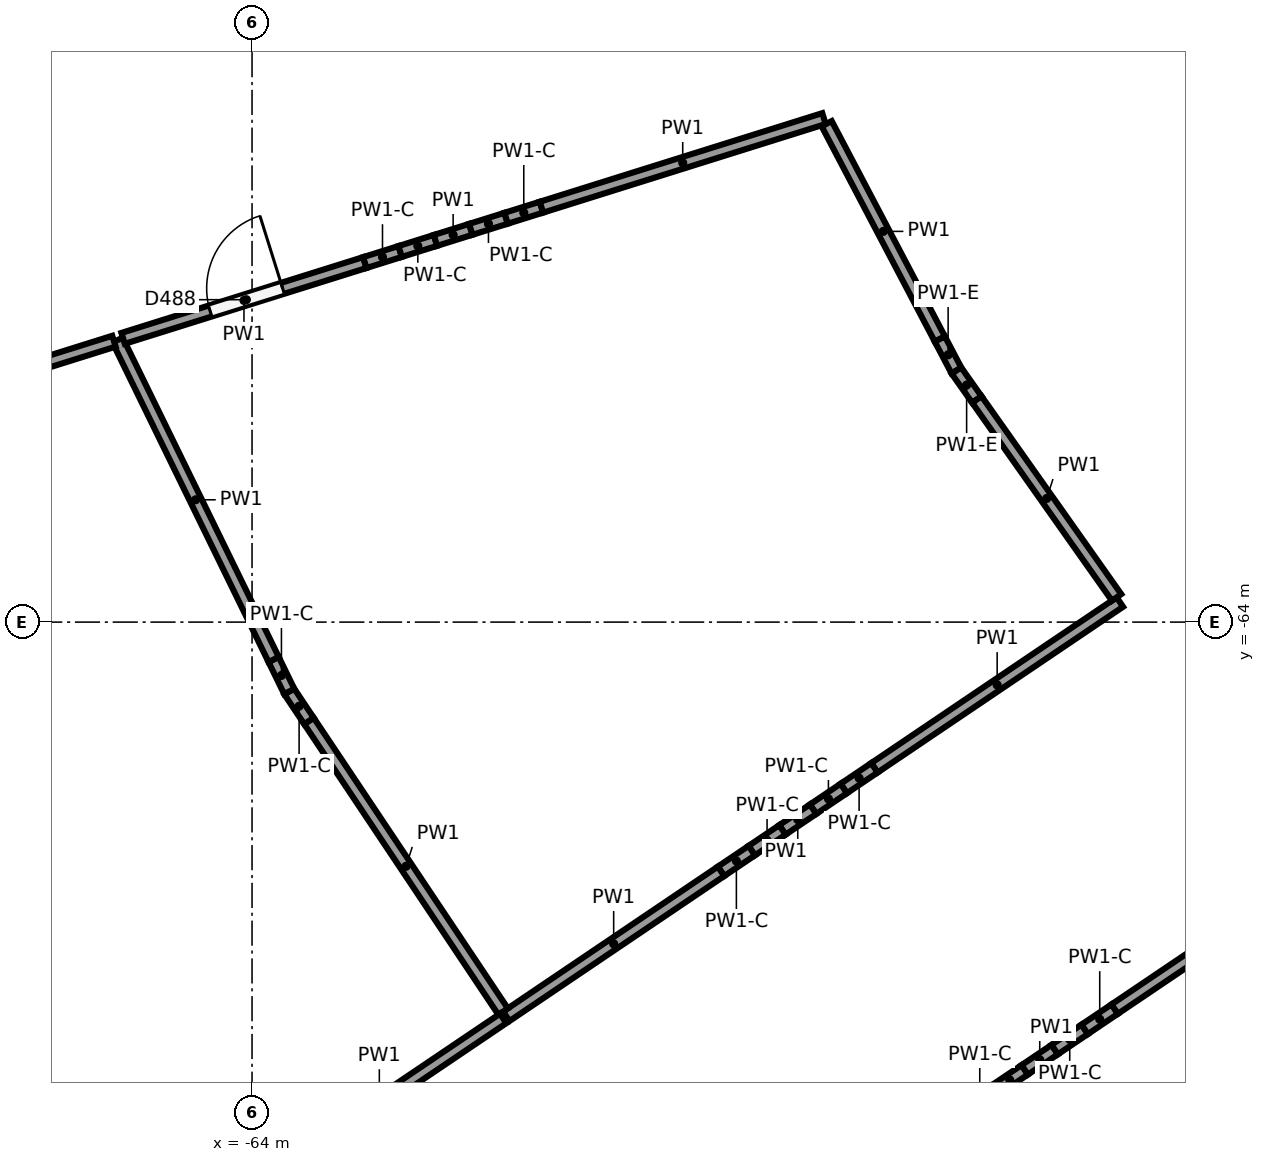
"""IFC4 building model, lengths in metres.
Left out: names, types, materials, properties, quantities, classifications, styles, units other than length and angle.
Written with IfcOpenShell. Run it as: python <this file> out.ifc"""

import sys

from ifc_helpers import new_model, si_unit, direction, frame, frame_2d, origin, origin_2d, place, context, subcontext, project, spatial, rectangle, circle, extrude, element, fill, save


model = new_model("IFC4")
c1 = context("Model", 3, precision=1e-05, world=origin(), true_north=direction((0.0, 1.0)))
c2 = subcontext(c1, "Body", "Model", "MODEL_VIEW")
j1 = project(units=[si_unit("LENGTHUNIT", "METRE"), si_unit("PLANEANGLEUNIT", "RADIAN")], contexts=[c1])
p1 = place(None, origin())
s1 = spatial("IfcSite", under=j1, at=p1, CompositionType="ELEMENT")
p2 = place(p1, origin())
s2 = spatial("IfcBuilding", under=s1, at=p2, CompositionType="ELEMENT")
p3 = place(p2, frame((0.0, 0.0, -4.0)))
s3 = spatial("IfcBuildingStorey", under=s2, at=p3, CompositionType="ELEMENT", Elevation=-4.0)
p4 = place(p3, frame((-61.723, -56.716, -0.4), z_axis=(0.0, 0.0, 1.0), x_axis=(1.0, 0.0, 0.0)))
e1 = element("IfcColumn", 1, at=p4, inside=s3, PredefinedType="COLUMN", context=c2, shape_type="SweptSolid", body=[
    extrude(circle(Radius=0.45, at=origin_2d()), origin(), (0.0, 0.0, 1.0), 4.4),
])
p5 = place(p3, frame((-62.964, -57.104, -0.4), z_axis=(0.0, 0.0, 1.0), x_axis=(1.0, 0.0, 0.0)))
e2 = element("IfcColumn", 2, at=p5, inside=s3, PredefinedType="COLUMN", context=c2, shape_type="SweptSolid", body=[
    extrude(circle(Radius=0.4, at=origin_2d()), origin(), (0.0, 0.0, 1.0), 4.4),
])
for number, where, z_axis, x_axis in (
    (3, (-54.364, -60.513, -0.4), (0.0, 0.0, 1.0), (1.0, 0.0, 0.0)),
    (4, (-59.049, -62.766, -0.4), (0.0, 0.0, 1.0), (1.0, 0.0, 0.0)),
):
    element("IfcColumn", number, at=place(p3, frame(where, z_axis=z_axis, x_axis=x_axis)), inside=s3, PredefinedType="COLUMN", context=c2, shape_type="SweptSolid", body=[
        extrude(circle(Radius=0.45, at=origin_2d()), origin(), (0.0, 0.0, 1.0), 4.4),
    ])
p6 = place(p3, frame((-60.222, -63.331, -0.4), z_axis=(0.0, 0.0, 1.0), x_axis=(1.0, 0.0, 0.0)))
e5 = element("IfcColumn", 5, at=p6, inside=s3, PredefinedType="COLUMN", context=c2, shape_type="SweptSolid", body=[
    extrude(circle(Radius=0.4, at=origin_2d()), origin(), (0.0, 0.0, 1.0), 4.4),
])
p7 = place(p3, frame((-54.82, -67.902, -0.4), z_axis=(0.0, 0.0, 1.0), x_axis=(1.0, 0.0, 0.0)))
e6 = element("IfcColumn", 6, at=p7, inside=s3, PredefinedType="COLUMN", context=c2, shape_type="SweptSolid", body=[
    extrude(circle(Radius=0.45, at=origin_2d()), origin(), (0.0, 0.0, 1.0), 4.4),
])
p8 = place(p3, frame((-55.94, -68.658, -0.4), z_axis=(0.0, 0.0, 1.0), x_axis=(1.0, 0.0, 0.0)))
e7 = element("IfcColumn", 7, at=p8, inside=s3, PredefinedType="COLUMN", context=c2, shape_type="SweptSolid", body=[
    extrude(circle(Radius=0.4, at=origin_2d()), origin(), (0.0, 0.0, 1.0), 4.4),
])
p9 = place(p3, frame((-52.582, -63.737, 0.0), z_axis=(0.0, 0.0, 1.0), x_axis=(-0.82882615394, -0.559506216718, 0.0)))
e8 = element("IfcWall", 8, at=p9, inside=s3, PredefinedType="PARTITIONING", context=c2, shape_type="SweptSolid", body=[
    extrude(rectangle(XDim=3.896, YDim=0.15, at=frame_2d((1.948, 0.0))), origin(), (0.0, 0.0, 1.0), 3.6),
])
p10 = place(p3, frame((-55.811, -65.917, 0.0), z_axis=(0.0, 0.0, 1.0), x_axis=(-0.828953242646, -0.559317907372, 0.0)))
e9 = element("IfcWall", 9, at=p10, inside=s3, PredefinedType="PARTITIONING", context=c2, shape_type="SweptSolid", body=[
    extrude(rectangle(XDim=0.487, YDim=0.15, at=frame_2d((0.244, 0.0))), origin(), (0.0, 0.0, 1.0), 2.7),
])
p11 = place(p3, frame((-56.215, -66.189, 0.0), z_axis=(0.0, 0.0, 1.0), x_axis=(-0.828796357195, -0.559550353678, 0.0)))
e10 = element("IfcWall", 10, at=p11, inside=s3, PredefinedType="PARTITIONING", context=c2, shape_type="SweptSolid", body=[
    extrude(rectangle(XDim=0.487, YDim=0.15, at=frame_2d((0.243, 0.0))), origin(), (0.0, 0.0, 1.0), 2.7),
])
p12 = place(p3, frame((-56.618, -66.461, 0.0), z_axis=(0.0, 0.0, 1.0), x_axis=(-0.828953242646, -0.559317907372, 0.0)))
e11 = element("IfcWall", 11, at=p12, inside=s3, PredefinedType="PARTITIONING", context=c2, shape_type="SweptSolid", body=[
    extrude(rectangle(XDim=0.487, YDim=0.15, at=frame_2d((0.244, 0.0))), origin(), (0.0, 0.0, 1.0), 3.6),
])
p13 = place(p3, frame((-57.022, -66.734, 0.0), z_axis=(0.0, 0.0, 1.0), x_axis=(-0.828563830016, -0.559894614717, 0.0)))
e12 = element("IfcWall", 12, at=p13, inside=s3, PredefinedType="PARTITIONING", context=c2, shape_type="SweptSolid", body=[
    extrude(rectangle(XDim=0.487, YDim=0.15, at=frame_2d((0.244, 0.0))), origin(), (0.0, 0.0, 1.0), 2.7),
])
p14 = place(p3, frame((-57.426, -67.007, 0.0), z_axis=(0.0, 0.0, 1.0), x_axis=(-0.828796357195, -0.559550353678, 0.0)))
e13 = element("IfcWall", 13, at=p14, inside=s3, PredefinedType="PARTITIONING", context=c2, shape_type="SweptSolid", body=[
    extrude(rectangle(XDim=0.487, YDim=0.15, at=frame_2d((0.243, 0.0))), origin(), (0.0, 0.0, 1.0), 2.7),
])
p15 = place(p3, frame((-57.829, -67.279, 0.0), z_axis=(0.0, 0.0, 1.0), x_axis=(-0.828841201566, -0.559483925226, 0.0)))
e14 = element("IfcWall", 14, at=p15, inside=s3, PredefinedType="PARTITIONING", context=c2, shape_type="SweptSolid", body=[
    extrude(rectangle(XDim=3.409, YDim=0.15, at=frame_2d((1.705, 0.0))), origin(), (0.0, 0.0, 1.0), 3.6),
])
p16 = place(p3, frame((-60.697, -69.124, 0.0), z_axis=(0.0, 0.0, 1.0), x_axis=(-0.555582071925, 0.831461701677, 0.0)))
e15 = element("IfcWall", 15, at=p16, inside=s3, PredefinedType="PARTITIONING", context=c2, shape_type="SweptSolid", body=[
    extrude(rectangle(XDim=4.598, YDim=0.15, at=frame_2d((2.299, 0.0))), origin(), (0.0, 0.0, 1.0), 3.6),
])
p17 = place(p3, frame((-63.251, -65.301, 0.0), z_axis=(0.0, 0.0, 1.0), x_axis=(-0.555302810798, 0.831648235927, 0.0)))
e16 = element("IfcWall", 16, at=p17, inside=s3, PredefinedType="PARTITIONING", context=c2, shape_type="SweptSolid", body=[
    extrude(rectangle(XDim=0.467, YDim=0.15, at=frame_2d((0.234, 0.0))), origin(), (0.0, 0.0, 1.0), 2.7),
])
p18 = place(p3, frame((-63.511, -64.912, 0.0), z_axis=(0.0, 0.0, 1.0), x_axis=(-0.439050948337, 0.898462166574, 0.0)))
e17 = element("IfcWall", 17, at=p18, inside=s3, PredefinedType="PARTITIONING", context=c2, shape_type="SweptSolid", body=[
    extrude(rectangle(XDim=0.468, YDim=0.15, at=frame_2d((0.234, 0.0))), origin(), (0.0, 0.0, 1.0), 2.7),
])
p19 = place(p3, frame((-63.716, -64.492, 0.0), z_axis=(0.0, 0.0, 1.0), x_axis=(-0.438947034321, 0.898512938728, 0.0)))
e18 = element("IfcWall", 18, at=p19, inside=s3, PredefinedType="PARTITIONING", context=c2, shape_type="SweptSolid", body=[
    extrude(rectangle(XDim=4.677, YDim=0.15, at=frame_2d((2.338, 0.0))), origin(), (0.0, 0.0, 1.0), 3.6),
])
p20 = place(p3, frame((-65.697, -60.267, 0.0), z_axis=(0.0, 0.0, 1.0), x_axis=(0.95420717929, 0.299146551026, 0.0)))
e19 = element("IfcWall", 19, at=p20, inside=s3, PredefinedType="PARTITIONING", context=c2, shape_type="SweptSolid", body=[
    extrude(rectangle(XDim=3.333, YDim=0.15, at=frame_2d((1.667, 0.0))), origin(), (0.0, 0.0, 1.0), 3.6),
])
p21 = place(p20, frame((1.2, 0.0, 0.0)))
e20 = element("IfcOpeningElement", 20, at=p21, cuts=e19, PredefinedType="OPENING", context=c2, shape_type="SweptSolid", body=[
    extrude(rectangle(XDim=1.0, YDim=2.1, at=frame_2d((0.5, 1.05))), frame((0.0, 0.085, 0.0), z_axis=(0.0, -1.0, 0.0), x_axis=(1.0, 0.0, 0.0)), (0.0, 0.0, 1.0), 0.17),
])
p22 = place(p3, frame((-62.516, -59.27, 0.0), z_axis=(0.0, 0.0, 1.0), x_axis=(0.954194187562, 0.299187988432, 0.0)))
e21 = element("IfcWall", 21, at=p22, inside=s3, PredefinedType="PARTITIONING", context=c2, shape_type="SweptSolid", body=[
    extrude(rectangle(XDim=0.487, YDim=0.15, at=frame_2d((0.244, 0.0))), origin(), (0.0, 0.0, 1.0), 2.7),
])
p23 = place(p3, frame((-62.051, -59.124, 0.0), z_axis=(0.0, 0.0, 1.0), x_axis=(0.954149295482, 0.299331124226, 0.0)))
e22 = element("IfcWall", 22, at=p23, inside=s3, PredefinedType="PARTITIONING", context=c2, shape_type="SweptSolid", body=[
    extrude(rectangle(XDim=0.487, YDim=0.15, at=frame_2d((0.243, 0.0))), origin(), (0.0, 0.0, 1.0), 2.7),
])
p24 = place(p3, frame((-61.587, -58.978, 0.0), z_axis=(0.0, 0.0, 1.0), x_axis=(0.954194187562, 0.299187988432, 0.0)))
e23 = element("IfcWall", 23, at=p24, inside=s3, PredefinedType="PARTITIONING", context=c2, shape_type="SweptSolid", body=[
    extrude(rectangle(XDim=0.487, YDim=0.15, at=frame_2d((0.244, 0.0))), origin(), (0.0, 0.0, 1.0), 3.6),
])
p25 = place(p3, frame((-61.122, -58.833, 0.0), z_axis=(0.0, 0.0, 1.0), x_axis=(0.954292408643, 0.298874553627, 0.0)))
e24 = element("IfcWall", 24, at=p25, inside=s3, PredefinedType="PARTITIONING", context=c2, shape_type="SweptSolid", body=[
    extrude(rectangle(XDim=0.487, YDim=0.15, at=frame_2d((0.243, 0.0))), origin(), (0.0, 0.0, 1.0), 2.7),
])
p26 = place(p3, frame((-60.657, -58.687, 0.0), z_axis=(0.0, 0.0, 1.0), x_axis=(0.954194187562, 0.299187988432, 0.0)))
e25 = element("IfcWall", 25, at=p26, inside=s3, PredefinedType="PARTITIONING", context=c2, shape_type="SweptSolid", body=[
    extrude(rectangle(XDim=0.487, YDim=0.15, at=frame_2d((0.244, 0.0))), origin(), (0.0, 0.0, 1.0), 2.7),
])
p27 = place(p3, frame((-60.192, -58.541, 0.0), z_axis=(0.0, 0.0, 1.0), x_axis=(0.954184030199, 0.299220381178, 0.0)))
e26 = element("IfcWall", 26, at=p27, inside=s3, PredefinedType="PARTITIONING", context=c2, shape_type="SweptSolid", body=[
    extrude(rectangle(XDim=3.896, YDim=0.15, at=frame_2d((1.948, 0.0))), origin(), (0.0, 0.0, 1.0), 3.6),
])
p28 = place(p3, frame((-56.439, -57.443, 0.0), z_axis=(0.0, 0.0, 1.0), x_axis=(0.465186694802, -0.885212595357, 0.0)))
e27 = element("IfcWall", 27, at=p28, inside=s3, PredefinedType="PARTITIONING", context=c2, shape_type="SweptSolid", body=[
    extrude(rectangle(XDim=3.2, YDim=0.15, at=frame_2d((1.6, 0.0))), origin(), (0.0, 0.0, 1.0), 3.6),
])
p29 = place(p3, frame((-54.95, -60.276, 0.0), z_axis=(0.0, 0.0, 1.0), x_axis=(0.465058676895, -0.885279858036, 0.0)))
e28 = element("IfcWall", 28, at=p29, inside=s3, PredefinedType="PARTITIONING", context=c2, shape_type="SweptSolid", body=[
    extrude(rectangle(XDim=0.468, YDim=0.15, at=frame_2d((0.234, 0.0))), origin(), (0.0, 0.0, 1.0), 2.85),
])
p30 = place(p3, frame((-54.733, -60.691, 0.0), z_axis=(0.0, 0.0, 1.0), x_axis=(0.576868319656, -0.816837157442, 0.0)))
e29 = element("IfcWall", 29, at=p30, inside=s3, PredefinedType="PARTITIONING", context=c2, shape_type="SweptSolid", body=[
    extrude(rectangle(XDim=0.466, YDim=0.15, at=frame_2d((0.233, 0.0))), origin(), (0.0, 0.0, 1.0), 2.85),
])
p31 = place(p3, frame((-54.464, -61.071, 0.0), z_axis=(0.0, 0.0, 1.0), x_axis=(0.576788435752, -0.816893567353, 0.0)))
e30 = element("IfcWall", 30, at=p31, inside=s3, PredefinedType="PARTITIONING", context=c2, shape_type="SweptSolid", body=[
    extrude(rectangle(XDim=3.188, YDim=0.15, at=frame_2d((1.594, 0.0))), origin(), (0.0, 0.0, 1.0), 3.6),
])
p32 = place(p3, frame((-60.696, -69.214, 0.0), z_axis=(0.0, 0.0, 1.0), x_axis=(-0.828825631308, -0.559506990919, 0.0)))
e31 = element("IfcWall", 31, at=p32, inside=s3, PredefinedType="PARTITIONING", context=c2, shape_type="SweptSolid", body=[
    extrude(rectangle(XDim=3.931, YDim=0.15, at=frame_2d((1.965, 0.0))), origin(), (0.0, 0.0, 1.0), 3.6),
])
p33 = place(p3, frame((-69.97, -61.607, 0.0), z_axis=(0.0, 0.0, 1.0), x_axis=(0.954191084053, 0.299197886211, 0.0)))
e32 = element("IfcWall", 32, at=p33, inside=s3, PredefinedType="PARTITIONING", context=c2, shape_type="SweptSolid", body=[
    extrude(rectangle(XDim=4.353, YDim=0.15, at=frame_2d((2.176, 0.0))), origin(), (0.0, 0.0, 1.0), 3.6),
])
p34 = place(p3, frame((-54.228, -70.157, 0.0), z_axis=(0.0, 0.0, 1.0), x_axis=(0.828961577554, 0.559305554182, 0.0)))
e33 = element("IfcWall", 33, at=p34, inside=s3, PredefinedType="PARTITIONING", context=c2, shape_type="SweptSolid", body=[
    extrude(rectangle(XDim=0.476, YDim=0.15, at=frame_2d((0.238, 0.0))), origin(), (0.0, 0.0, 1.0), 2.7),
])
p35 = place(p3, frame((-53.833, -69.89, 0.0), z_axis=(0.0, 0.0, 1.0), x_axis=(0.828563254438, 0.559895466489, 0.0)))
e34 = element("IfcWall", 34, at=p35, inside=s3, PredefinedType="PARTITIONING", context=c2, shape_type="SweptSolid", body=[
    extrude(rectangle(XDim=0.476, YDim=0.15, at=frame_2d((0.238, 0.0))), origin(), (0.0, 0.0, 1.0), 3.6),
])
p36 = place(p3, frame((-53.439, -69.624, 0.0), z_axis=(0.0, 0.0, 1.0), x_axis=(0.828961577554, 0.559305554182, 0.0)))
e35 = element("IfcWall", 35, at=p36, inside=s3, PredefinedType="PARTITIONING", context=c2, shape_type="SweptSolid", body=[
    extrude(rectangle(XDim=0.476, YDim=0.15, at=frame_2d((0.238, 0.0))), origin(), (0.0, 0.0, 1.0), 2.7),
])
p37 = place(p3, frame((-53.044, -69.357, 0.0), z_axis=(0.0, 0.0, 1.0), x_axis=(0.828801105453, 0.559543320575, 0.0)))
e36 = element("IfcWall", 36, at=p37, inside=s3, PredefinedType="PARTITIONING", context=c2, shape_type="SweptSolid", body=[
    extrude(rectangle(XDim=0.476, YDim=0.15, at=frame_2d((0.238, 0.0))), origin(), (0.0, 0.0, 1.0), 2.7),
])
p38 = place(p3, frame((-52.65, -69.091, 0.0), z_axis=(0.0, 0.0, 1.0), x_axis=(0.828831583129, 0.559498174088, 0.0)))
e37 = element("IfcWall", 37, at=p38, inside=s3, PredefinedType="PARTITIONING", context=c2, shape_type="SweptSolid", body=[
    extrude(rectangle(XDim=3.809, YDim=0.15, at=frame_2d((1.904, 0.0))), origin(), (0.0, 0.0, 1.0), 3.6),
])
p39 = place(p21, origin())
e38 = element("IfcDoor", 38, at=p39, inside=s3, OperationType="SINGLE_SWING_RIGHT", PredefinedType="DOOR", context=c2, shape_type="SweptSolid", body=[
    extrude(rectangle(XDim=1.0, YDim=2.1, at=frame_2d((0.5, 1.05))), frame((0.0, 0.025, 0.0), z_axis=(0.0, -1.0, 0.0), x_axis=(1.0, 0.0, 0.0)), (0.0, 0.0, 1.0), 0.05),
])
fill(e20, e38)
save(model, sys.argv[1])
